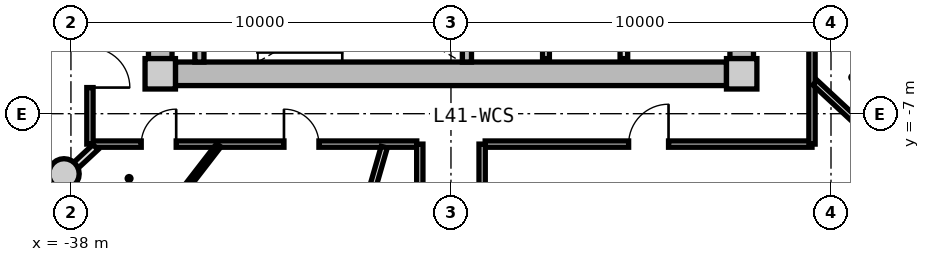
"""IFC4 building model, lengths in metres.
Left out: names, types, materials, properties, quantities, classifications, styles, units other than length and angle.
Written with IfcOpenShell. Run it as: python <this file> out.ifc"""

import sys

from ifc_helpers import new_model, si_unit, direction, frame, frame_2d, origin, origin_2d, place, context, subcontext, project, spatial, rectangle, circle, extrude, source, transform, mapped, element, fill, save


model = new_model("IFC4")
c1 = context("Model", 3, precision=1e-05, world=origin(), true_north=direction((0.0, 1.0)))
c2 = subcontext(c1, "Body", "Model", "MODEL_VIEW")
j1 = project(units=[si_unit("LENGTHUNIT", "METRE"), si_unit("PLANEANGLEUNIT", "RADIAN")], contexts=[c1])
p1 = place(None, origin())
s1 = spatial("IfcSite", under=j1, at=p1, CompositionType="ELEMENT")
p2 = place(p1, origin())
s2 = spatial("IfcBuilding", under=s1, at=p2, CompositionType="ELEMENT")
p3 = place(p2, frame((0.0, 0.0, 134.3)))
s3 = spatial("IfcBuildingStorey", under=s2, at=p3, CompositionType="ELEMENT", Elevation=134.3)
m1 = source(origin(), c2, "Body", "SweptSolid", [
    extrude(rectangle(XDim=0.8, YDim=0.8, at=origin_2d()), origin(), (0.0, 0.0, 1.0), 3.05),
])
for number, where, z_axis, x_axis in (
    (1, (-35.65, -5.95, 0.0), (0.0, 0.0, 1.0), (1.0, 0.0, 0.0)),
    (2, (-20.35, -5.95, 0.0), (0.0, 0.0, 1.0), (1.0, 0.0, 0.0)),
):
    element("IfcColumn", number, at=place(p3, frame(where, z_axis=z_axis, x_axis=x_axis)), inside=s3, PredefinedType="COLUMN", context=c2, shape_type="MappedRepresentation", body=[
        mapped(m1, transform((0.0, 0.0, 0.0), x_axis=(1.0, 0.0, 0.0), y_axis=(0.0, 1.0, 0.0), z_axis=(0.0, 0.0, 1.0), scale=1.0)),
    ])
m2 = source(origin(), c2, "Body", "SweptSolid", [
    extrude(rectangle(XDim=14.5, YDim=0.62, at=frame_2d((7.25, 0.0))), origin(), (0.0, 0.0, 1.0), 2.81),
])
p4 = place(p3, frame((-20.75, -5.95, 0.0), z_axis=(0.0, 0.0, 1.0), x_axis=(-1.0, 0.0, 0.0)))
e3 = element("IfcWall", 3, at=p4, inside=s3, PredefinedType="SHEAR", context=c2, shape_type="MappedRepresentation", body=[
    mapped(m2, transform((0.0, 0.0, 0.0), x_axis=(1.0, 0.0, 0.0), y_axis=(0.0, 1.0, 0.0), z_axis=(0.0, 0.0, 1.0), scale=1.0)),
])
m3 = source(origin(), c2, "Body", "SweptSolid", [
    extrude(rectangle(XDim=11.1, YDim=0.62, at=frame_2d((5.55, 0.0))), origin(), (0.0, 0.0, 1.0), 2.81),
])
p5 = place(p3, frame((-35.65, -5.55, 0.0), z_axis=(0.0, 0.0, 1.0), x_axis=(0.0, 1.0, 0.0)))
e4 = element("IfcWall", 4, at=p5, inside=s3, PredefinedType="SHEAR", context=c2, shape_type="MappedRepresentation", body=[
    mapped(m3, transform((0.0, 0.0, 0.0), x_axis=(1.0, 0.0, 0.0), y_axis=(0.0, 1.0, 0.0), z_axis=(0.0, 0.0, 1.0), scale=1.0)),
])
p6 = place(p5, frame((3.8, 0.0, 0.0)))
e5 = element("IfcOpeningElement", 5, at=p6, cuts=e4, PredefinedType="OPENING", context=c2, shape_type="SweptSolid", body=[
    extrude(rectangle(XDim=1.2, YDim=2.15, at=frame_2d((0.6, 1.075))), frame((0.0, 0.32, 0.0), z_axis=(0.0, -1.0, 0.0), x_axis=(1.0, 0.0, 0.0)), (0.0, 0.0, 1.0), 0.64),
])
p7 = place(p3, frame((-20.35, 5.55, 0.0), z_axis=(0.0, 0.0, 1.0), x_axis=(0.0, -1.0, 0.0)))
e6 = element("IfcWall", 6, at=p7, inside=s3, PredefinedType="SHEAR", context=c2, shape_type="MappedRepresentation", body=[
    mapped(m3, transform((0.0, 0.0, 0.0), x_axis=(1.0, 0.0, 0.0), y_axis=(0.0, 1.0, 0.0), z_axis=(0.0, 0.0, 1.0), scale=1.0)),
])
p8 = place(p7, frame((5.65, 0.0, 0.0)))
e7 = element("IfcOpeningElement", 7, at=p8, cuts=e6, PredefinedType="OPENING", context=c2, shape_type="SweptSolid", body=[
    extrude(rectangle(XDim=1.2, YDim=2.15, at=frame_2d((0.6, 1.075))), frame((0.0, 0.32, 0.0), z_axis=(0.0, -1.0, 0.0), x_axis=(1.0, 0.0, 0.0)), (0.0, 0.0, 1.0), 0.64),
])
p9 = place(p7, frame((9.3, 0.0, 0.0)))
e8 = element("IfcOpeningElement", 8, at=p9, cuts=e6, PredefinedType="OPENING", context=c2, shape_type="SweptSolid", body=[
    extrude(rectangle(XDim=1.0, YDim=2.1, at=frame_2d((0.5, 1.05))), frame((0.0, 0.32, 0.0), z_axis=(0.0, -1.0, 0.0), x_axis=(1.0, 0.0, 0.0)), (0.0, 0.0, 1.0), 0.64),
])
m4 = source(origin(), c2, "Body", "SweptSolid", [
    extrude(circle(Radius=0.4, at=origin_2d()), origin(), (0.0, 0.0, 1.0), 3.47),
])
p10 = place(p3, frame((-38.183, -8.584, -0.42), z_axis=(0.0, 0.0, 1.0), x_axis=(1.0, 0.0, 0.0)))
e9 = element("IfcColumn", 9, at=p10, inside=s3, PredefinedType="COLUMN", context=c2, shape_type="MappedRepresentation", body=[
    mapped(m4, transform((0.0, 0.0, 0.0), x_axis=(1.0, 0.0, 0.0), y_axis=(0.0, 1.0, 0.0), z_axis=(0.0, 0.0, 1.0), scale=1.0)),
])
m5 = source(origin(), c2, "Body", "SweptSolid", [
    extrude(rectangle(XDim=3.19, YDim=0.24, at=frame_2d((1.595, 0.0))), origin(), (0.0, 0.0, 1.0), 2.81),
])
for number, where, z_axis, x_axis in (
    (10, (-34.62, -5.64, 0.0), (0.0, 0.0, 1.0), (0.0, 1.0, 0.0)),
    (11, (-27.58, -5.64, 0.0), (0.0, 0.0, 1.0), (0.0, 1.0, 0.0)),
):
    element("IfcWall", number, at=place(p3, frame(where, z_axis=z_axis, x_axis=x_axis)), inside=s3, PredefinedType="PARTITIONING", context=c2, shape_type="MappedRepresentation", body=[
        mapped(m5, transform((0.0, 0.0, 0.0), x_axis=(1.0, 0.0, 0.0), y_axis=(0.0, 1.0, 0.0), z_axis=(0.0, 0.0, 1.0), scale=1.0)),
    ])
m6 = source(origin(), c2, "Body", "SweptSolid", [
    extrude(rectangle(XDim=3.8, YDim=0.2, at=frame_2d((1.9, 0.0))), origin(), (0.0, 0.0, 1.0), 2.795),
])
p11 = place(p3, frame((-23.45, -5.55, 0.0), z_axis=(0.0, 0.0, 1.0), x_axis=(0.0, 1.0, 0.0)))
e12 = element("IfcWall", 12, at=p11, inside=s3, PredefinedType="PARTITIONING", context=c2, shape_type="MappedRepresentation", body=[
    mapped(m6, transform((0.0, 0.0, 0.0), x_axis=(1.0, 0.0, 0.0), y_axis=(0.0, 1.0, 0.0), z_axis=(0.0, 0.0, 1.0), scale=1.0)),
])
m7 = source(origin(), c2, "Body", "SweptSolid", [
    extrude(rectangle(XDim=3.22, YDim=0.18, at=frame_2d((1.61, 0.0))), origin(), (0.0, 0.0, 1.0), 2.795),
])
p12 = place(p3, frame((-25.5, -5.55, 0.0), z_axis=(0.0, 0.0, 1.0), x_axis=(0.0, 1.0, 0.0)))
e13 = element("IfcWall", 13, at=p12, inside=s3, PredefinedType="PARTITIONING", context=c2, shape_type="MappedRepresentation", body=[
    mapped(m7, transform((0.0, 0.0, 0.0), x_axis=(1.0, 0.0, 0.0), y_axis=(0.0, 1.0, 0.0), z_axis=(0.0, 0.0, 1.0), scale=1.0)),
])
m8 = source(origin(), c2, "Body", "SweptSolid", [
    extrude(rectangle(XDim=8.6, YDim=0.165, at=frame_2d((4.3, 0.0))), origin(), (0.0, 0.0, 1.0), 2.795),
])
p13 = place(p3, frame((-18.5, -7.8, 0.0), z_axis=(0.0, 0.0, 1.0), x_axis=(-1.0, 0.0, 0.0)))
e14 = element("IfcWall", 14, at=p13, inside=s3, PredefinedType="PARTITIONING", context=c2, shape_type="MappedRepresentation", body=[
    mapped(m8, transform((0.0, 0.0, 0.0), x_axis=(1.0, 0.0, 0.0), y_axis=(0.0, 1.0, 0.0), z_axis=(0.0, 0.0, 1.0), scale=1.0)),
])
p14 = place(p13, frame((3.775, 0.0, 0.0)))
e15 = element("IfcOpeningElement", 15, at=p14, cuts=e14, PredefinedType="OPENING", context=c2, shape_type="SweptSolid", body=[
    extrude(rectangle(XDim=1.05, YDim=2.15, at=frame_2d((0.525, 1.075))), frame((0.0, 0.093, 0.0), z_axis=(0.0, -1.0, 0.0), x_axis=(1.0, 0.0, 0.0)), (0.0, 0.0, 1.0), 0.185),
])
p15 = place(p3, frame((-28.9, -7.8, 0.0), z_axis=(0.0, 0.0, 1.0), x_axis=(-1.0, 0.0, 0.0)))
e16 = element("IfcWall", 16, at=p15, inside=s3, PredefinedType="PARTITIONING", context=c2, shape_type="MappedRepresentation", body=[
    mapped(m8, transform((0.0, 0.0, 0.0), x_axis=(1.0, 0.0, 0.0), y_axis=(0.0, 1.0, 0.0), z_axis=(0.0, 0.0, 1.0), scale=1.0)),
])
p16 = place(p15, frame((6.33, 0.0, 0.0)))
e17 = element("IfcOpeningElement", 17, at=p16, cuts=e16, PredefinedType="OPENING", context=c2, shape_type="SweptSolid", body=[
    extrude(rectangle(XDim=0.92, YDim=2.1, at=frame_2d((0.46, 1.05))), frame((0.0, 0.093, 0.0), z_axis=(0.0, -1.0, 0.0), x_axis=(1.0, 0.0, 0.0)), (0.0, 0.0, 1.0), 0.185),
])
p17 = place(p15, frame((2.575, 0.0, 0.0)))
e18 = element("IfcOpeningElement", 18, at=p17, cuts=e16, PredefinedType="OPENING", context=c2, shape_type="SweptSolid", body=[
    extrude(rectangle(XDim=0.92, YDim=2.1, at=frame_2d((0.46, 1.05))), frame((0.0, 0.093, 0.0), z_axis=(0.0, -1.0, 0.0), x_axis=(1.0, 0.0, 0.0)), (0.0, 0.0, 1.0), 0.185),
])
m9 = source(origin(), c2, "Body", "SweptSolid", [
    extrude(rectangle(XDim=15.6, YDim=0.165, at=frame_2d((7.8, 0.0))), origin(), (0.0, 0.0, 1.0), 2.795),
])
p18 = place(p3, frame((-37.5, -7.8, 0.0), z_axis=(0.0, 0.0, 1.0), x_axis=(0.0, 1.0, 0.0)))
e19 = element("IfcWall", 19, at=p18, inside=s3, PredefinedType="PARTITIONING", context=c2, shape_type="MappedRepresentation", body=[
    mapped(m9, transform((0.0, 0.0, 0.0), x_axis=(1.0, 0.0, 0.0), y_axis=(0.0, 1.0, 0.0), z_axis=(0.0, 0.0, 1.0), scale=1.0)),
])
p19 = place(p18, frame((8.95, 0.0, 0.0)))
e20 = element("IfcOpeningElement", 20, at=p19, cuts=e19, PredefinedType="OPENING", context=c2, shape_type="SweptSolid", body=[
    extrude(rectangle(XDim=1.25, YDim=2.2, at=frame_2d((0.625, 1.1))), frame((0.0, 0.093, 0.0), z_axis=(0.0, -1.0, 0.0), x_axis=(1.0, 0.0, 0.0)), (0.0, 0.0, 1.0), 0.185),
])
p20 = place(p18, frame((4.851, 0.0, 0.0)))
e21 = element("IfcOpeningElement", 21, at=p20, cuts=e19, PredefinedType="OPENING", context=c2, shape_type="SweptSolid", body=[
    extrude(rectangle(XDim=1.05, YDim=2.15, at=frame_2d((0.525, 1.075))), frame((0.0, 0.093, 0.0), z_axis=(0.0, -1.0, 0.0), x_axis=(1.0, 0.0, 0.0)), (0.0, 0.0, 1.0), 0.185),
])
p21 = place(p18, frame((1.488, 0.0, 0.0)))
e22 = element("IfcOpeningElement", 22, at=p21, cuts=e19, PredefinedType="OPENING", context=c2, shape_type="SweptSolid", body=[
    extrude(rectangle(XDim=1.05, YDim=2.15, at=frame_2d((0.525, 1.075))), frame((0.0, 0.093, 0.0), z_axis=(0.0, -1.0, 0.0), x_axis=(1.0, 0.0, 0.0)), (0.0, 0.0, 1.0), 0.185),
])
p22 = place(p3, frame((-18.5, 7.8, 0.0), z_axis=(0.0, 0.0, 1.0), x_axis=(0.0, -1.0, 0.0)))
e23 = element("IfcWall", 23, at=p22, inside=s3, PredefinedType="PARTITIONING", context=c2, shape_type="MappedRepresentation", body=[
    mapped(m9, transform((0.0, 0.0, 0.0), x_axis=(1.0, 0.0, 0.0), y_axis=(0.0, 1.0, 0.0), z_axis=(0.0, 0.0, 1.0), scale=1.0)),
])
p23 = place(p22, frame((10.881, 0.0, 0.0)))
e24 = element("IfcOpeningElement", 24, at=p23, cuts=e23, PredefinedType="OPENING", context=c2, shape_type="SweptSolid", body=[
    extrude(rectangle(XDim=1.05, YDim=2.15, at=frame_2d((0.525, 1.075))), frame((0.0, 0.093, 0.0), z_axis=(0.0, -1.0, 0.0), x_axis=(1.0, 0.0, 0.0)), (0.0, 0.0, 1.0), 0.185),
])
p24 = place(p22, frame((8.844, 0.0, 0.0)))
e25 = element("IfcOpeningElement", 25, at=p24, cuts=e23, PredefinedType="OPENING", context=c2, shape_type="SweptSolid", body=[
    extrude(rectangle(XDim=1.05, YDim=2.15, at=frame_2d((0.525, 1.075))), frame((0.0, 0.093, 0.0), z_axis=(0.0, -1.0, 0.0), x_axis=(1.0, 0.0, 0.0)), (0.0, 0.0, 1.0), 0.185),
])
p25 = place(p22, frame((3.596, 0.0, 0.0)))
e26 = element("IfcOpeningElement", 26, at=p25, cuts=e23, PredefinedType="OPENING", context=c2, shape_type="SweptSolid", body=[
    extrude(rectangle(XDim=1.25, YDim=2.2, at=frame_2d((0.625, 1.1))), frame((0.0, 0.093, 0.0), z_axis=(0.0, -1.0, 0.0), x_axis=(1.0, 0.0, 0.0)), (0.0, 0.0, 1.0), 0.185),
])
m10 = source(origin(), c2, "Body", "SweptSolid", [
    extrude(rectangle(XDim=6.035, YDim=0.165, at=frame_2d((3.018, 0.0))), origin(), (0.0, 0.0, 1.0), 2.345),
])
p26 = place(p3, frame((-29.756, -7.88, 0.0), z_axis=(0.0, 0.0, 1.0), x_axis=(-0.276809454862, -0.960924828329, 0.0)))
e27 = element("IfcWall", 27, at=p26, inside=s3, PredefinedType="PARTITIONING", context=c2, shape_type="MappedRepresentation", body=[
    mapped(m10, transform((0.0, 0.0, 0.0), x_axis=(1.0, 0.0, 0.0), y_axis=(0.0, 1.0, 0.0), z_axis=(0.0, 0.0, 1.0), scale=1.0)),
])
m11 = source(origin(), c2, "Body", "SweptSolid", [
    extrude(rectangle(XDim=4.927, YDim=0.165, at=frame_2d((2.463, 0.0))), origin(), (0.0, 0.0, 1.0), 2.345),
])
p27 = place(p3, frame((-18.42, -6.183, 0.0), z_axis=(0.0, 0.0, 1.0), x_axis=(0.732191335987, -0.681098999783, 0.0)))
e28 = element("IfcWall", 28, at=p27, inside=s3, PredefinedType="PARTITIONING", context=c2, shape_type="MappedRepresentation", body=[
    mapped(m11, transform((0.0, 0.0, 0.0), x_axis=(1.0, 0.0, 0.0), y_axis=(0.0, 1.0, 0.0), z_axis=(0.0, 0.0, 1.0), scale=1.0)),
])
m12 = source(origin(), c2, "Body", "SweptSolid", [
    extrude(rectangle(XDim=4.685, YDim=0.165, at=frame_2d((2.342, 0.0))), origin(), (0.0, 0.0, 1.0), 2.795),
])
p28 = place(p3, frame((-28.82, -12.485, 0.0), z_axis=(0.0, 0.0, 1.0), x_axis=(0.0, 1.0, 0.0)))
e29 = element("IfcWall", 29, at=p28, inside=s3, PredefinedType="PARTITIONING", context=c2, shape_type="MappedRepresentation", body=[
    mapped(m12, transform((0.0, 0.0, 0.0), x_axis=(1.0, 0.0, 0.0), y_axis=(0.0, 1.0, 0.0), z_axis=(0.0, 0.0, 1.0), scale=1.0)),
])
p29 = place(p28, frame((1.817, 0.0, 0.0)))
e30 = element("IfcOpeningElement", 30, at=p29, cuts=e29, PredefinedType="OPENING", context=c2, shape_type="SweptSolid", body=[
    extrude(rectangle(XDim=1.05, YDim=2.15, at=frame_2d((0.525, 1.075))), frame((0.0, 0.093, 0.0), z_axis=(0.0, -1.0, 0.0), x_axis=(1.0, 0.0, 0.0)), (0.0, 0.0, 1.0), 0.185),
])
p30 = place(p3, frame((-27.18, -12.485, 0.0), z_axis=(0.0, 0.0, 1.0), x_axis=(0.0, 1.0, 0.0)))
e31 = element("IfcWall", 31, at=p30, inside=s3, PredefinedType="PARTITIONING", context=c2, shape_type="MappedRepresentation", body=[
    mapped(m12, transform((0.0, 0.0, 0.0), x_axis=(1.0, 0.0, 0.0), y_axis=(0.0, 1.0, 0.0), z_axis=(0.0, 0.0, 1.0), scale=1.0)),
])
m13 = source(origin(), c2, "Body", "SweptSolid", [
    extrude(rectangle(XDim=2.435, YDim=0.19, at=frame_2d((1.217, 0.0))), origin(), (0.0, 0.0, 1.0), 2.345),
])
p31 = place(p3, frame((-37.354, -7.88, 0.0), z_axis=(0.0, 0.0, 1.0), x_axis=(-0.732164643118, -0.681127693878, 0.0)))
e32 = element("IfcWall", 32, at=p31, inside=s3, PredefinedType="PARTITIONING", context=c2, shape_type="MappedRepresentation", body=[
    mapped(m13, transform((0.0, 0.0, 0.0), x_axis=(1.0, 0.0, 0.0), y_axis=(0.0, 1.0, 0.0), z_axis=(0.0, 0.0, 1.0), scale=1.0)),
])
m14 = source(origin(), c2, "Body", "SweptSolid", [
    extrude(rectangle(XDim=4.335, YDim=0.19, at=frame_2d((2.168, 0.0))), origin(), (0.0, 0.0, 1.0), 2.795),
])
p32 = place(p3, frame((-37.53, -3.926, 0.0), z_axis=(0.0, 0.0, 1.0), x_axis=(-0.884108234352, -0.4672821738, 0.0)))
e33 = element("IfcWall", 33, at=p32, inside=s3, PredefinedType="PARTITIONING", context=c2, shape_type="MappedRepresentation", body=[
    mapped(m14, transform((0.0, 0.0, 0.0), x_axis=(1.0, 0.0, 0.0), y_axis=(0.0, 1.0, 0.0), z_axis=(0.0, 0.0, 1.0), scale=1.0)),
])
m15 = source(origin(), c2, "Body", "SweptSolid", [
    extrude(rectangle(XDim=3.937, YDim=0.14, at=frame_2d((1.968, 0.0))), origin(), (0.0, 0.0, 1.0), 2.795),
])
p33 = place(p3, frame((-34.11, -7.83, 0.0), z_axis=(0.0, 0.0, 1.0), x_axis=(-0.611016723561, -0.791617687731, 0.0)))
e34 = element("IfcWall", 34, at=p33, inside=s3, PredefinedType="PARTITIONING", context=c2, shape_type="MappedRepresentation", body=[
    mapped(m15, transform((0.0, 0.0, 0.0), x_axis=(1.0, 0.0, 0.0), y_axis=(0.0, 1.0, 0.0), z_axis=(0.0, 0.0, 1.0), scale=1.0)),
])
m16 = source(origin(), c2, "Body", "SweptSolid", [
    extrude(rectangle(XDim=6.499, YDim=0.19, at=frame_2d((3.25, 0.0))), origin(), (0.0, 0.0, 1.0), 2.795),
])
p34 = place(p3, frame((-18.324, -2.898, 0.0), z_axis=(0.0, 0.0, 1.0), x_axis=(0.882700013711, -0.469936895545, 0.0)))
e35 = element("IfcWall", 35, at=p34, inside=s3, PredefinedType="PARTITIONING", context=c2, shape_type="MappedRepresentation", body=[
    mapped(m16, transform((0.0, 0.0, 0.0), x_axis=(1.0, 0.0, 0.0), y_axis=(0.0, 1.0, 0.0), z_axis=(0.0, 0.0, 1.0), scale=1.0)),
])
m17 = source(origin(), c2, "Body", "SweptSolid", [
    extrude(rectangle(XDim=2.563, YDim=0.14, at=frame_2d((1.282, 0.0))), origin(), (0.0, 0.0, 1.0), 2.795),
])
p35 = place(p3, frame((-18.47, -4.397, 0.0), z_axis=(0.0, 0.0, 1.0), x_axis=(0.809308208957, -0.587384220859, 0.0)))
e36 = element("IfcWall", 36, at=p35, inside=s3, PredefinedType="PARTITIONING", context=c2, shape_type="MappedRepresentation", body=[
    mapped(m17, transform((0.0, 0.0, 0.0), x_axis=(1.0, 0.0, 0.0), y_axis=(0.0, 1.0, 0.0), z_axis=(0.0, 0.0, 1.0), scale=1.0)),
])
p36 = place(p35, frame((0.822, 0.0, 0.0)))
e37 = element("IfcOpeningElement", 37, at=p36, cuts=e36, PredefinedType="OPENING", context=c2, shape_type="SweptSolid", body=[
    extrude(rectangle(XDim=0.92, YDim=2.1, at=frame_2d((0.46, 1.05))), frame((0.0, 0.08, 0.0), z_axis=(0.0, -1.0, 0.0), x_axis=(1.0, 0.0, 0.0)), (0.0, 0.0, 1.0), 0.16),
])
m18 = source(origin(), c2, "Body", "SweptSolid", [
    extrude(rectangle(XDim=1.05, YDim=2.15, at=frame_2d((0.525, 1.075))), frame((0.0, 0.025, 0.0), z_axis=(0.0, -1.0, 0.0), x_axis=(1.0, 0.0, 0.0)), (0.0, 0.0, 1.0), 0.05),
])
p37 = place(p14, frame((1.05, 0.0, 0.0), z_axis=(0.0, 0.0, 1.0), x_axis=(-1.0, 0.0, 0.0)))
e38 = element("IfcDoor", 38, at=p37, inside=s3, OperationType="SINGLE_SWING_RIGHT", PredefinedType="DOOR", context=c2, shape_type="MappedRepresentation", body=[
    mapped(m18, transform((0.0, 0.0, 0.0), x_axis=(1.0, 0.0, 0.0), y_axis=(0.0, 1.0, 0.0), z_axis=(0.0, 0.0, 1.0), scale=1.0)),
])
fill(e15, e38)
p38 = place(p21, frame((1.05, 0.0, 0.0), z_axis=(0.0, 0.0, 1.0), x_axis=(-1.0, 0.0, 0.0)))
e39 = element("IfcDoor", 39, at=p38, inside=s3, OperationType="SINGLE_SWING_RIGHT", PredefinedType="DOOR", context=c2, shape_type="MappedRepresentation", body=[
    mapped(m18, transform((0.0, 0.0, 0.0), x_axis=(1.0, 0.0, 0.0), y_axis=(0.0, 1.0, 0.0), z_axis=(0.0, 0.0, 1.0), scale=1.0)),
])
fill(e22, e39)
m19 = source(origin(), c2, "Body", "SweptSolid", [
    extrude(rectangle(XDim=0.92, YDim=2.1, at=frame_2d((0.46, 1.05))), frame((0.0, 0.025, 0.0), z_axis=(0.0, -1.0, 0.0), x_axis=(1.0, 0.0, 0.0)), (0.0, 0.0, 1.0), 0.05),
])
p39 = place(p16, frame((0.92, 0.0, 0.0), z_axis=(0.0, 0.0, 1.0), x_axis=(-1.0, 0.0, 0.0)))
e40 = element("IfcDoor", 40, at=p39, inside=s3, OperationType="SINGLE_SWING_RIGHT", PredefinedType="DOOR", context=c2, shape_type="MappedRepresentation", body=[
    mapped(m19, transform((0.0, 0.0, 0.0), x_axis=(1.0, 0.0, 0.0), y_axis=(0.0, 1.0, 0.0), z_axis=(0.0, 0.0, 1.0), scale=1.0)),
])
fill(e17, e40)
p40 = place(p17, frame((0.92, 0.0, 0.0), z_axis=(0.0, 0.0, 1.0), x_axis=(-1.0, 0.0, 0.0)))
e41 = element("IfcDoor", 41, at=p40, inside=s3, OperationType="SINGLE_SWING_LEFT", PredefinedType="DOOR", context=c2, shape_type="MappedRepresentation", body=[
    mapped(m19, transform((0.0, 0.0, 0.0), x_axis=(1.0, 0.0, 0.0), y_axis=(0.0, 1.0, 0.0), z_axis=(0.0, 0.0, 1.0), scale=1.0)),
])
fill(e18, e41)
p41 = place(p36, origin())
e42 = element("IfcDoor", 42, at=p41, inside=s3, OperationType="SINGLE_SWING_RIGHT", PredefinedType="DOOR", context=c2, shape_type="MappedRepresentation", body=[
    mapped(m19, transform((0.0, 0.0, 0.0), x_axis=(1.0, 0.0, 0.0), y_axis=(0.0, 1.0, 0.0), z_axis=(0.0, 0.0, 1.0), scale=1.0)),
])
fill(e37, e42)
save(model, sys.argv[1])
